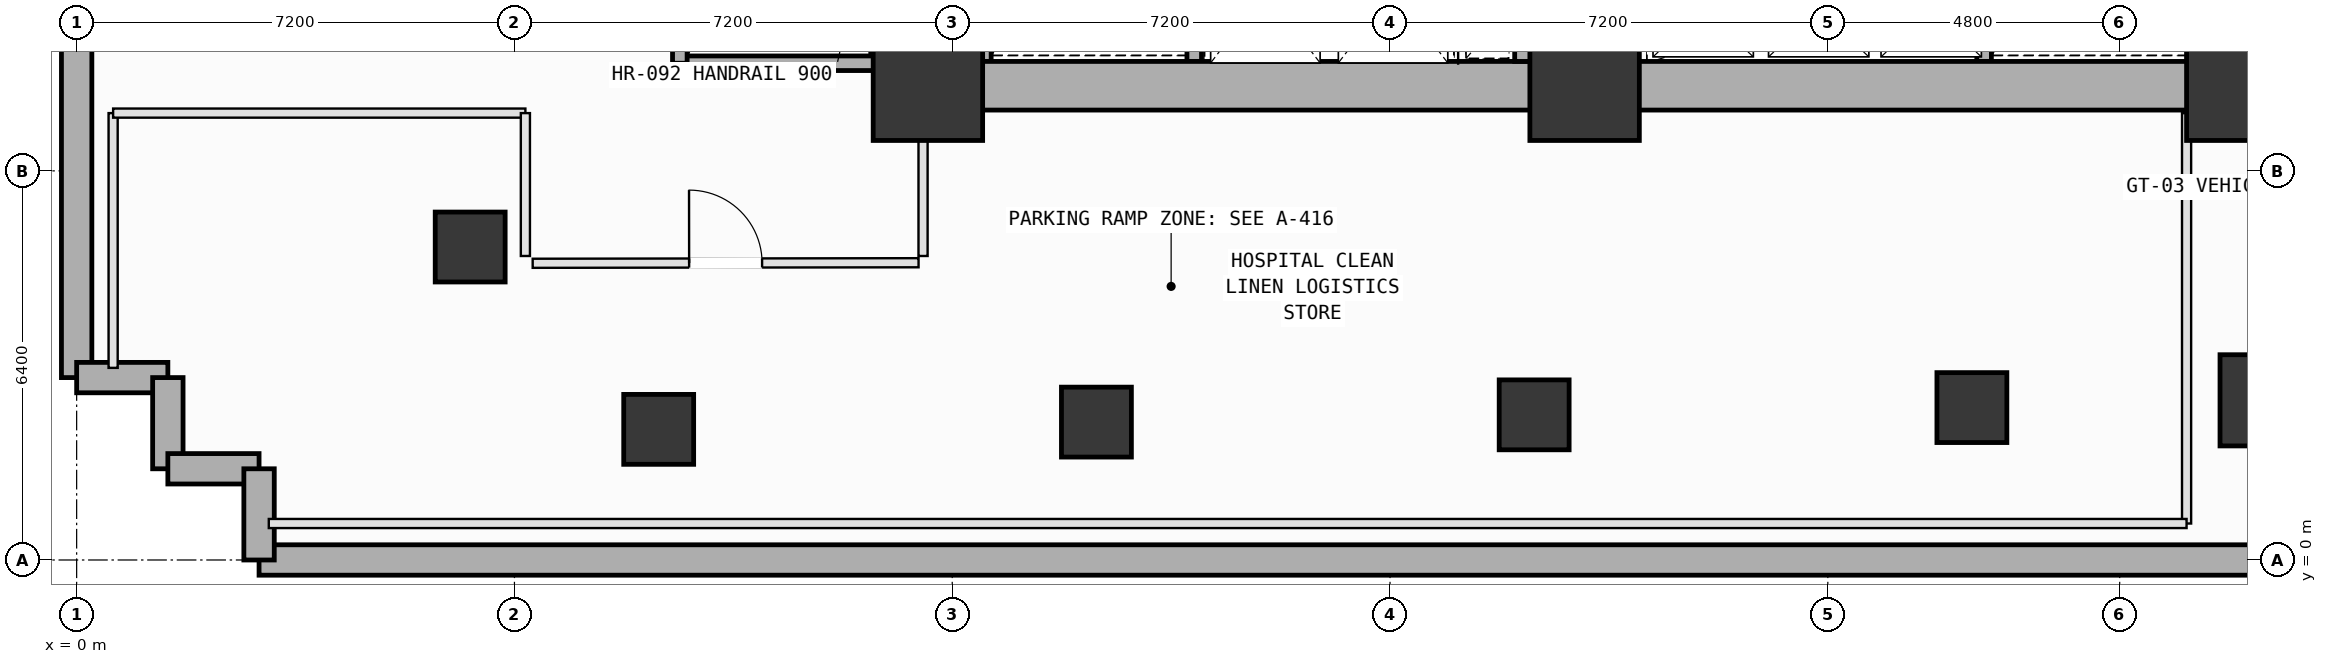
"""IFC4 building model, lengths in metres.
Left out: names, types, materials, properties, quantities, classifications, styles, units other than length and angle.
Written with IfcOpenShell. Run it as: python <this file> out.ifc"""

import sys

from ifc_helpers import new_model, si_unit, direction, frame, frame_2d, origin, origin_2d, place, context, subcontext, project, spatial, rectangle, extrude, element, fill, save


model = new_model("IFC4")
c1 = context("Model", 3, precision=1e-05, world=origin(), true_north=direction((0.0, 1.0)))
c2 = subcontext(c1, "Body", "Model", "MODEL_VIEW")
j1 = project(units=[si_unit("LENGTHUNIT", "METRE"), si_unit("PLANEANGLEUNIT", "RADIAN")], contexts=[c1])
p1 = place(None, origin())
s1 = spatial("IfcSite", under=j1, at=p1, CompositionType="ELEMENT")
p2 = place(p1, origin())
s2 = spatial("IfcBuilding", under=s1, at=p2, CompositionType="ELEMENT")
p3 = place(p2, frame((0.0, 0.0, -4.8)))
s3 = spatial("IfcBuildingStorey", under=s2, at=p3, CompositionType="ELEMENT", Elevation=-4.8)
for number, where, z_axis, x_axis in (
    (1, (14.0, 7.8, 0.0), (0.0, 0.0, 1.0), (1.0, 0.0, 0.0)),
    (2, (24.8, 7.8, 0.0), (0.0, 0.0, 1.0), (1.0, 0.0, 0.0)),
    (3, (35.6, 7.8, 0.0), (0.0, 0.0, 1.0), (1.0, 0.0, 0.0)),
):
    element("IfcColumn", number, at=place(p3, frame(where, z_axis=z_axis, x_axis=x_axis)), inside=s3, PredefinedType="COLUMN", context=c2, shape_type="SweptSolid", body=[
        extrude(rectangle(XDim=1.8, YDim=1.8, at=origin_2d()), origin(), (0.0, 0.0, 1.0), 4.8),
    ])
p4 = place(p3, frame((36.0, 2.626, 0.0), z_axis=(0.0, 0.0, 1.0), x_axis=(1.0, 0.0, 0.0)))
e4 = element("IfcColumn", 4, at=p4, inside=s3, PredefinedType="PILASTER", context=c2, shape_type="SweptSolid", body=[
    extrude(rectangle(XDim=1.5, YDim=1.5, at=origin_2d()), origin(), (0.0, 0.0, 1.0), 4.8),
])
for number, where, z_axis, x_axis in (
    (5, (9.572, 2.148, 0.0), (0.0, 0.0, 1.0), (1.0, 0.0, 0.0)),
    (6, (16.771, 2.268, 0.0), (0.0, 0.0, 1.0), (1.0, 0.0, 0.0)),
    (7, (23.97, 2.387, 0.0), (0.0, 0.0, 1.0), (1.0, 0.0, 0.0)),
    (8, (31.169, 2.507, 0.0), (0.0, 0.0, 1.0), (1.0, 0.0, 0.0)),
    (9, (6.472, 5.147, 0.0), (0.0, 0.0, 1.0), (1.0, 0.0, 0.0)),
):
    element("IfcColumn", number, at=place(p3, frame(where, z_axis=z_axis, x_axis=x_axis)), inside=s3, PredefinedType="COLUMN", context=c2, shape_type="SweptSolid", body=[
        extrude(rectangle(XDim=1.15, YDim=1.15, at=origin_2d()), origin(), (0.0, 0.0, 1.0), 4.8),
    ])
p5 = place(p3, frame((79.8, 0.0, 0.0), z_axis=(0.0, 0.0, 1.0), x_axis=(-1.0, 0.0, 0.0)))
e10 = element("IfcWall", 10, at=p5, inside=s3, PredefinedType="USERDEFINED", context=c2, shape_type="SweptSolid", body=[
    extrude(rectangle(XDim=76.8, YDim=0.5, at=frame_2d((38.4, 0.0))), origin(), (0.0, 0.0, 1.0), 4.55),
])
p6 = place(p3, frame((0.0, 3.0, 0.0), z_axis=(0.0, 0.0, 1.0), x_axis=(0.0, 1.0, 0.0)))
e11 = element("IfcWall", 11, at=p6, inside=s3, PredefinedType="USERDEFINED", context=c2, shape_type="SweptSolid", body=[
    extrude(rectangle(XDim=45.2, YDim=0.5, at=frame_2d((22.6, 0.0))), origin(), (0.0, 0.0, 1.0), 4.55),
])
for number, where, z_axis, x_axis in (
    (12, (1.5, 3.0, 0.0), (0.0, 0.0, 1.0), (-1.0, 0.0, 0.0)),
    (13, (1.5, 1.5, 0.0), (0.0, 0.0, 1.0), (0.0, 1.0, 0.0)),
    (14, (3.0, 1.5, 0.0), (0.0, 0.0, 1.0), (-1.0, 0.0, 0.0)),
    (15, (3.0, 0.0, 0.0), (0.0, 0.0, 1.0), (0.0, 1.0, 0.0)),
):
    element("IfcWall", number, at=place(p3, frame(where, z_axis=z_axis, x_axis=x_axis)), inside=s3, PredefinedType="USERDEFINED", context=c2, shape_type="SweptSolid", body=[
        extrude(rectangle(XDim=1.5, YDim=0.5, at=frame_2d((0.75, 0.0))), origin(), (0.0, 0.0, 1.0), 4.55),
    ])
for number, where, z_axis, x_axis in (
    (16, (18.38, 15.12, 0.0), (0.0, 0.0, 1.0), (0.0, -1.0, 0.0)),
    (17, (14.92, 8.2, 0.0), (0.0, 0.0, 1.0), (0.0, 1.0, 0.0)),
    (18, (34.83, 15.12, 0.0), (0.0, 0.0, 1.0), (0.0, -1.0, 0.0)),
    (19, (31.37, 8.2, 0.0), (0.0, 0.0, 1.0), (0.0, 1.0, 0.0)),
):
    element("IfcWall", number, at=place(p3, frame(where, z_axis=z_axis, x_axis=x_axis)), inside=s3, PredefinedType="SOLIDWALL", context=c2, shape_type="SweptSolid", body=[
        extrude(rectangle(XDim=6.92, YDim=0.24, at=frame_2d((3.46, 0.0))), origin(), (0.0, 0.0, 1.0), 4.55),
    ])
p7 = place(p3, frame((13.18, 15.22, 0.0), z_axis=(0.0, 0.0, 1.0), x_axis=(0.0, -1.0, 0.0)))
e20 = element("IfcWall", 20, at=p7, inside=s3, PredefinedType="SOLIDWALL", context=c2, shape_type="SweptSolid", body=[
    extrude(rectangle(XDim=7.05, YDim=0.24, at=frame_2d((3.525, 0.0))), origin(), (0.0, 0.0, 1.0), 4.55),
])
p8 = place(p3, frame((13.18, 8.17, 0.0), z_axis=(0.0, 0.0, 1.0), x_axis=(-1.0, 0.0, 0.0)))
e21 = element("IfcWall", 21, at=p8, inside=s3, PredefinedType="SOLIDWALL", context=c2, shape_type="SweptSolid", body=[
    extrude(rectangle(XDim=3.26, YDim=0.24, at=frame_2d((1.63, 0.0))), origin(), (0.0, 0.0, 1.0), 4.55),
])
p9 = place(p3, frame((9.92, 8.17, 0.0), z_axis=(0.0, 0.0, 1.0), x_axis=(0.0, 1.0, 0.0)))
e22 = element("IfcWall", 22, at=p9, inside=s3, PredefinedType="SOLIDWALL", context=c2, shape_type="SweptSolid", body=[
    extrude(rectangle(XDim=7.05, YDim=0.24, at=frame_2d((3.525, 0.0))), origin(), (0.0, 0.0, 1.0), 4.55),
])
for number, where, z_axis, x_axis in (
    (23, (14.0, 7.8, 0.0), (0.0, 0.0, 1.0), (1.0, 0.0, 0.0)),
    (24, (24.8, 7.8, 0.0), (0.0, 0.0, 1.0), (1.0, 0.0, 0.0)),
):
    element("IfcWall", number, at=place(p3, frame(where, z_axis=z_axis, x_axis=x_axis)), inside=s3, PredefinedType="SHEAR", context=c2, shape_type="SweptSolid", body=[
        extrude(rectangle(XDim=10.8, YDim=0.8, at=frame_2d((5.4, 0.0))), origin(), (0.0, 0.0, 1.0), 4.55),
    ])
for number, where, z_axis, x_axis in (
    (25, (35.6, 7.8, 0.0), (0.0, 0.0, 1.0), (0.0, 1.0, 0.0)),
    (26, (14.0, 16.8, 0.0), (0.0, 0.0, 1.0), (0.0, -1.0, 0.0)),
):
    element("IfcWall", number, at=place(p3, frame(where, z_axis=z_axis, x_axis=x_axis)), inside=s3, PredefinedType="SHEAR", context=c2, shape_type="SweptSolid", body=[
        extrude(rectangle(XDim=9.0, YDim=0.8, at=frame_2d((4.5, 0.0))), origin(), (0.0, 0.0, 1.0), 4.55),
    ])
p10 = place(p3, frame((23.8, 8.2, 0.0), z_axis=(0.0, 0.0, 1.0), x_axis=(0.0, 1.0, 0.0)))
e27 = element("IfcWall", 27, at=p10, inside=s3, PredefinedType="SOLIDWALL", context=c2, shape_type="SweptSolid", body=[
    extrude(rectangle(XDim=2.48, YDim=0.3, at=frame_2d((1.24, 0.0))), origin(), (0.0, 0.0, 1.0), 4.55),
])
p11 = place(p3, frame((0.6, 3.16, 0.0), z_axis=(0.0, 0.0, 1.0), x_axis=(0.0, 1.0, 0.0)))
e28 = element("IfcWall", 28, at=p11, inside=s3, PredefinedType="PARTITIONING", context=c2, shape_type="SweptSolid", body=[
    extrude(rectangle(XDim=4.19, YDim=0.15, at=frame_2d((2.095, 0.0))), origin(), (0.0, 0.0, 1.0), 4.55),
])
p12 = place(p3, frame((0.6, 7.35, 0.0), z_axis=(0.0, 0.0, 1.0), x_axis=(1.0, 0.0, 0.0)))
e29 = element("IfcWall", 29, at=p12, inside=s3, PredefinedType="PARTITIONING", context=c2, shape_type="SweptSolid", body=[
    extrude(rectangle(XDim=6.78, YDim=0.15, at=frame_2d((3.39, 0.0))), origin(), (0.0, 0.0, 1.0), 4.55),
])
p13 = place(p3, frame((7.38, 7.35, 0.0), z_axis=(0.0, 0.0, 1.0), x_axis=(0.0, -1.0, 0.0)))
e30 = element("IfcWall", 30, at=p13, inside=s3, PredefinedType="PARTITIONING", context=c2, shape_type="SweptSolid", body=[
    extrude(rectangle(XDim=2.35, YDim=0.15, at=frame_2d((1.175, 0.0))), origin(), (0.0, 0.0, 1.0), 3.735),
])
p14 = place(p3, frame((7.5, 4.88, 0.0), z_axis=(0.0, 0.0, 1.0), x_axis=(0.999998986882, 0.00142345872, 0.0)))
e31 = element("IfcWall", 31, at=p14, inside=s3, PredefinedType="PARTITIONING", context=c2, shape_type="SweptSolid", body=[
    extrude(rectangle(XDim=6.346, YDim=0.15, at=frame_2d((3.173, 0.0))), origin(), (0.0, 0.0, 1.0), 3.735),
])
p15 = place(p14, frame((2.573, 0.0, 0.0)))
e32 = element("IfcOpeningElement", 32, at=p15, cuts=e31, PredefinedType="OPENING", context=c2, shape_type="SweptSolid", body=[
    extrude(rectangle(XDim=1.2, YDim=2.15, at=frame_2d((0.6, 1.075))), frame((0.0, 0.085, 0.0), z_axis=(0.0, -1.0, 0.0), x_axis=(1.0, 0.0, 0.0)), (0.0, 0.0, 1.0), 0.17),
])
p16 = place(p3, frame((13.92, 5.0, 0.0), z_axis=(0.0, 0.0, 1.0), x_axis=(0.0, 1.0, 0.0)))
e33 = element("IfcWall", 33, at=p16, inside=s3, PredefinedType="PARTITIONING", context=c2, shape_type="SweptSolid", body=[
    extrude(rectangle(XDim=2.35, YDim=0.15, at=frame_2d((1.175, 0.0))), origin(), (0.0, 0.0, 1.0), 4.55),
])
p17 = place(p3, frame((34.7, 7.35, 0.0), z_axis=(0.0, 0.0, 1.0), x_axis=(0.0, -1.0, 0.0)))
e34 = element("IfcWall", 34, at=p17, inside=s3, PredefinedType="PARTITIONING", context=c2, shape_type="SweptSolid", body=[
    extrude(rectangle(XDim=6.75, YDim=0.15, at=frame_2d((3.375, 0.0))), origin(), (0.0, 0.0, 1.0), 4.55),
])
p18 = place(p3, frame((34.7, 0.6, 0.0), z_axis=(0.0, 0.0, 1.0), x_axis=(-1.0, 0.0, 0.0)))
e35 = element("IfcWall", 35, at=p18, inside=s3, PredefinedType="PARTITIONING", context=c2, shape_type="SweptSolid", body=[
    extrude(rectangle(XDim=31.54, YDim=0.15, at=frame_2d((15.77, 0.0))), origin(), (0.0, 0.0, 1.0), 4.55),
])
p19 = place(p15, origin())
e36 = element("IfcDoor", 36, at=p19, inside=s3, OperationType="SINGLE_SWING_LEFT", PredefinedType="DOOR", context=c2, shape_type="SweptSolid", body=[
    extrude(rectangle(XDim=1.2, YDim=2.15, at=frame_2d((0.6, 1.075))), frame((0.0, 0.025, 0.0), z_axis=(0.0, -1.0, 0.0), x_axis=(1.0, 0.0, 0.0)), (0.0, 0.0, 1.0), 0.05),
])
fill(e32, e36)
save(model, sys.argv[1])
